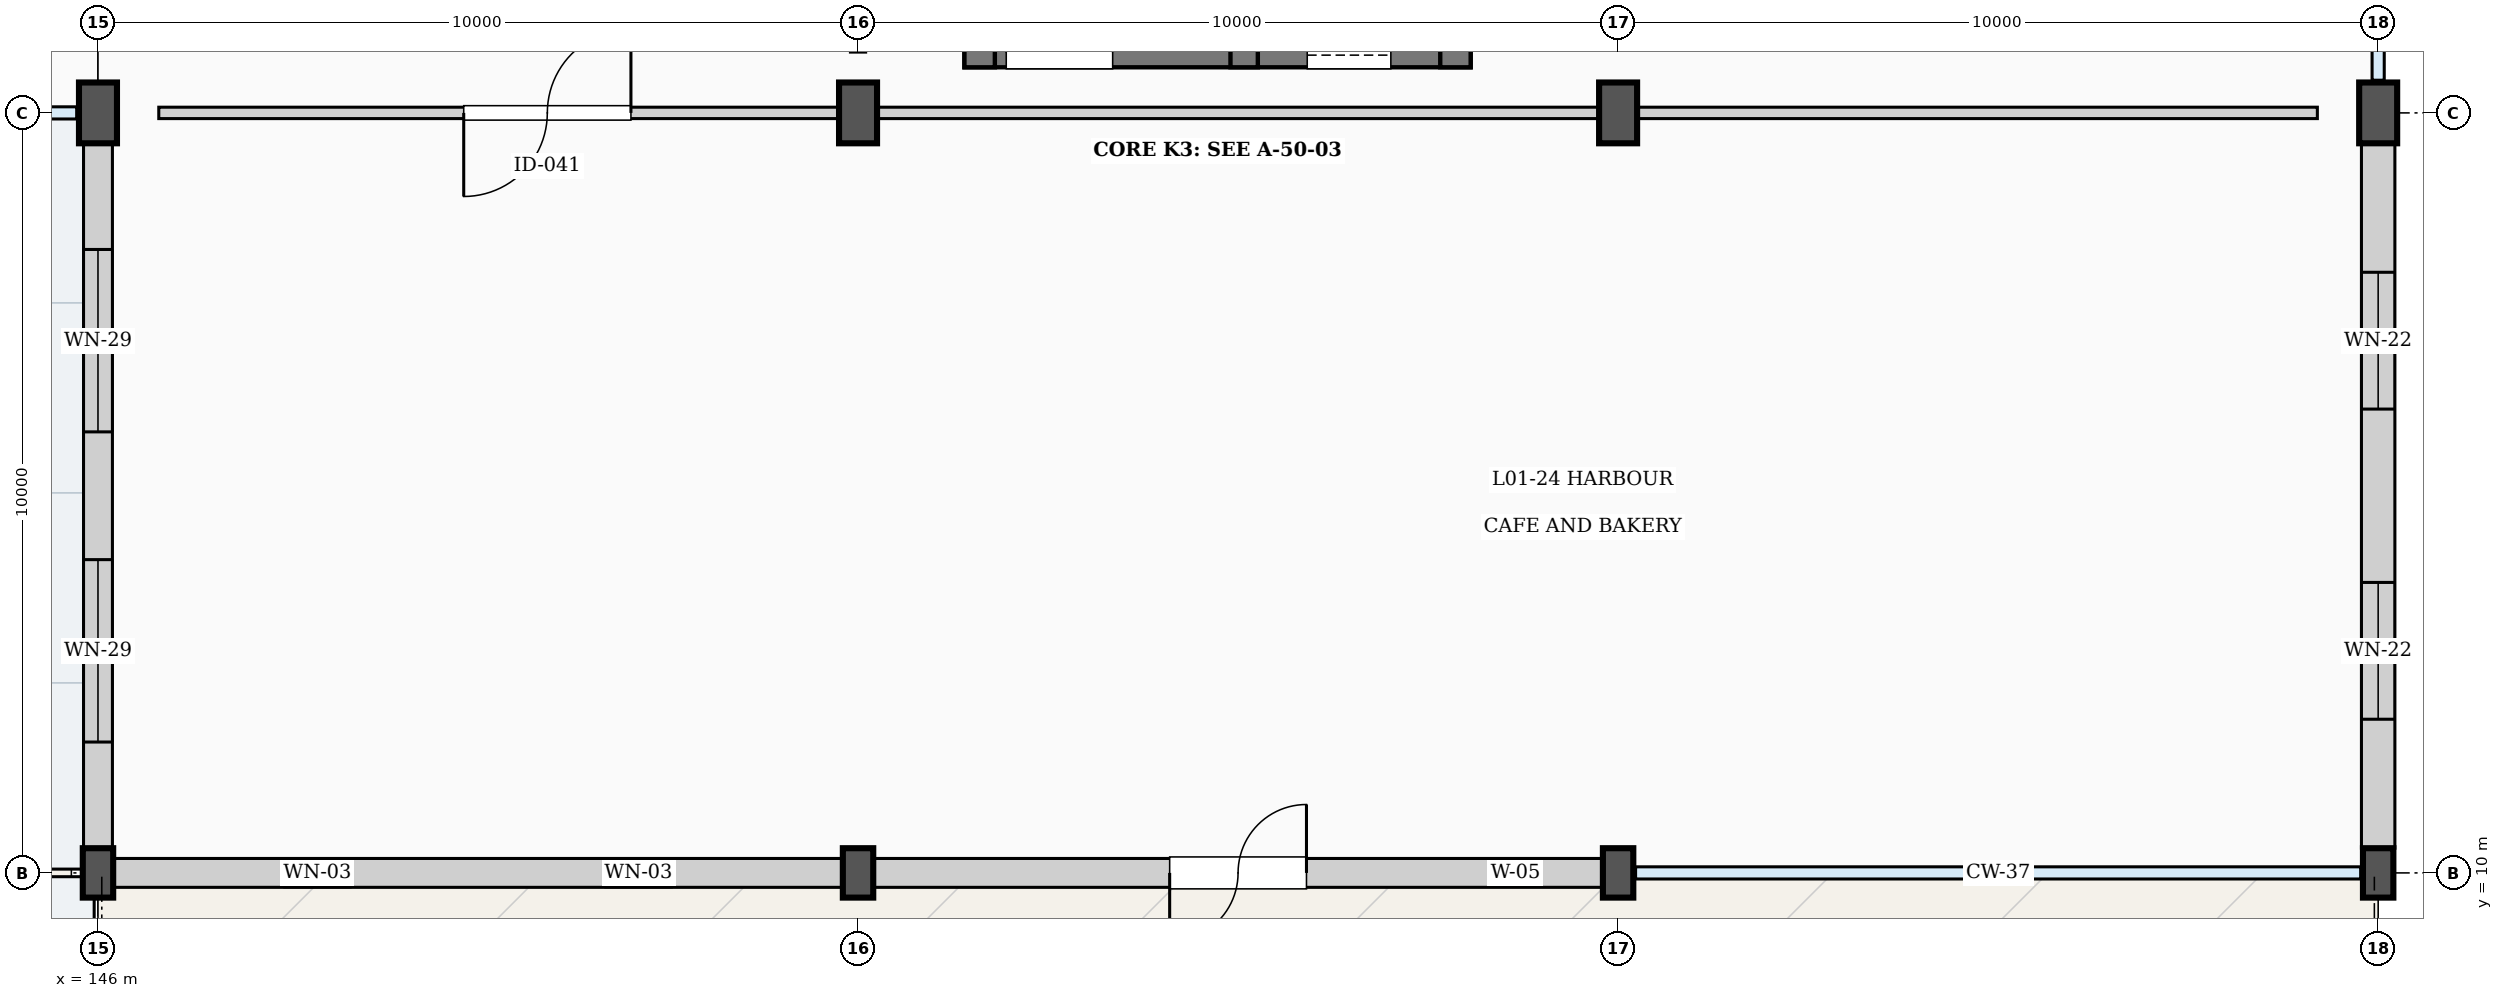
"""IFC4 building model, lengths in metres.
Left out: names, types, materials, properties, quantities, classifications, styles, units other than length and angle.
Written with IfcOpenShell. Run it as: python <this file> out.ifc"""

import sys

from ifc_helpers import new_model, si_unit, direction, frame, frame_2d, origin, origin_2d, place, context, subcontext, project, spatial, rectangle, extrude, element, fill, save


model = new_model("IFC4")
c1 = context("Model", 3, precision=1e-05, world=origin(), true_north=direction((0.0, 1.0)))
c2 = subcontext(c1, "Body", "Model", "MODEL_VIEW")
j1 = project(units=[si_unit("LENGTHUNIT", "METRE"), si_unit("PLANEANGLEUNIT", "RADIAN")], contexts=[c1])
p1 = place(None, origin())
s1 = spatial("IfcSite", under=j1, at=p1, CompositionType="ELEMENT")
p2 = place(p1, origin())
s2 = spatial("IfcBuilding", under=s1, at=p2, CompositionType="ELEMENT")
p3 = place(p2, frame((0.0, 0.0, 5.4)))
s3 = spatial("IfcBuildingStorey", under=s2, at=p3, CompositionType="ELEMENT", Elevation=5.4)
p4 = place(p3, frame((146.0, 10.0, 0.0), z_axis=(0.0, 0.0, 1.0), x_axis=(1.0, 0.0, 0.0)))
e1 = element("IfcColumn", 1, at=p4, inside=s3, PredefinedType="COLUMN", context=c2, shape_type="SweptSolid", body=[
    extrude(rectangle(XDim=0.4, YDim=0.65, at=origin_2d()), origin(), (0.0, 0.0, 1.0), 4.8),
])
p5 = place(p3, frame((146.0, 20.0, 0.0), z_axis=(0.0, 0.0, 1.0), x_axis=(1.0, 0.0, 0.0)))
e2 = element("IfcColumn", 2, at=p5, inside=s3, PredefinedType="COLUMN", context=c2, shape_type="SweptSolid", body=[
    extrude(rectangle(XDim=0.5, YDim=0.8, at=origin_2d()), origin(), (0.0, 0.0, 1.0), 4.8),
])
p6 = place(p3, frame((156.0, 10.0, 0.0), z_axis=(0.0, 0.0, 1.0), x_axis=(1.0, 0.0, 0.0)))
e3 = element("IfcColumn", 3, at=p6, inside=s3, PredefinedType="COLUMN", context=c2, shape_type="SweptSolid", body=[
    extrude(rectangle(XDim=0.4, YDim=0.65, at=origin_2d()), origin(), (0.0, 0.0, 1.0), 4.8),
])
p7 = place(p3, frame((156.0, 20.0, 0.0), z_axis=(0.0, 0.0, 1.0), x_axis=(1.0, 0.0, 0.0)))
e4 = element("IfcColumn", 4, at=p7, inside=s3, PredefinedType="COLUMN", context=c2, shape_type="SweptSolid", body=[
    extrude(rectangle(XDim=0.5, YDim=0.8, at=origin_2d()), origin(), (0.0, 0.0, 1.0), 4.8),
])
p8 = place(p3, frame((166.0, 10.0, 0.0), z_axis=(0.0, 0.0, 1.0), x_axis=(1.0, 0.0, 0.0)))
e5 = element("IfcColumn", 5, at=p8, inside=s3, PredefinedType="COLUMN", context=c2, shape_type="SweptSolid", body=[
    extrude(rectangle(XDim=0.4, YDim=0.65, at=origin_2d()), origin(), (0.0, 0.0, 1.0), 4.8),
])
p9 = place(p3, frame((166.0, 20.0, 0.0), z_axis=(0.0, 0.0, 1.0), x_axis=(1.0, 0.0, 0.0)))
e6 = element("IfcColumn", 6, at=p9, inside=s3, PredefinedType="COLUMN", context=c2, shape_type="SweptSolid", body=[
    extrude(rectangle(XDim=0.5, YDim=0.8, at=origin_2d()), origin(), (0.0, 0.0, 1.0), 4.8),
])
p10 = place(p3, frame((176.0, 10.0, 0.0), z_axis=(0.0, 0.0, 1.0), x_axis=(1.0, 0.0, 0.0)))
e7 = element("IfcColumn", 7, at=p10, inside=s3, PredefinedType="COLUMN", context=c2, shape_type="SweptSolid", body=[
    extrude(rectangle(XDim=0.4, YDim=0.65, at=origin_2d()), origin(), (0.0, 0.0, 1.0), 4.8),
])
p11 = place(p3, frame((176.0, 20.0, 0.0), z_axis=(0.0, 0.0, 1.0), x_axis=(1.0, 0.0, 0.0)))
e8 = element("IfcColumn", 8, at=p11, inside=s3, PredefinedType="COLUMN", context=c2, shape_type="SweptSolid", body=[
    extrude(rectangle(XDim=0.5, YDim=0.8, at=origin_2d()), origin(), (0.0, 0.0, 1.0), 4.8),
])
p12 = place(p3, frame((146.2, 10.0, 0.0), z_axis=(0.0, 0.0, 1.0), x_axis=(1.0, 0.0, 0.0)))
e9 = element("IfcWall", 9, at=p12, inside=s3, PredefinedType="SOLIDWALL", context=c2, shape_type="SweptSolid", body=[
    extrude(rectangle(XDim=9.6, YDim=0.38, at=frame_2d((4.8, 0.0))), origin(), (0.0, 0.0, 1.0), 4.05),
])
p13 = place(p12, frame((2.238, 0.0, 0.9)))
e10 = element("IfcOpeningElement", 10, at=p13, cuts=e9, PredefinedType="OPENING", context=c2, shape_type="SweptSolid", body=[
    extrude(rectangle(XDim=0.9, YDim=2.1, at=frame_2d((0.45, 1.05))), frame((0.0, 0.2, 0.0), z_axis=(0.0, -1.0, 0.0), x_axis=(1.0, 0.0, 0.0)), (0.0, 0.0, 1.0), 0.4),
])
p14 = place(p12, frame((6.462, 0.0, 0.9)))
e11 = element("IfcOpeningElement", 11, at=p14, cuts=e9, PredefinedType="OPENING", context=c2, shape_type="SweptSolid", body=[
    extrude(rectangle(XDim=0.9, YDim=2.1, at=frame_2d((0.45, 1.05))), frame((0.0, 0.2, 0.0), z_axis=(0.0, -1.0, 0.0), x_axis=(1.0, 0.0, 0.0)), (0.0, 0.0, 1.0), 0.4),
])
p15 = place(p3, frame((156.2, 10.0, 0.0), z_axis=(0.0, 0.0, 1.0), x_axis=(1.0, 0.0, 0.0)))
e12 = element("IfcWall", 12, at=p15, inside=s3, PredefinedType="SOLIDWALL", context=c2, shape_type="SweptSolid", body=[
    extrude(rectangle(XDim=9.6, YDim=0.38, at=frame_2d((4.8, 0.0))), origin(), (0.0, 0.0, 1.0), 4.05),
])
p16 = place(p15, frame((3.9, 0.0, 0.0)))
e13 = element("IfcOpeningElement", 13, at=p16, cuts=e12, PredefinedType="OPENING", context=c2, shape_type="SweptSolid", body=[
    extrude(rectangle(XDim=1.8, YDim=2.35, at=frame_2d((0.9, 1.175))), frame((0.0, 0.2, 0.0), z_axis=(0.0, -1.0, 0.0), x_axis=(1.0, 0.0, 0.0)), (0.0, 0.0, 1.0), 0.4),
])
p17 = place(p3, frame((146.0, 10.325, 0.0), z_axis=(0.0, 0.0, 1.0), x_axis=(0.0, 1.0, 0.0)))
e14 = element("IfcWall", 14, at=p17, inside=s3, PredefinedType="SOLIDWALL", context=c2, shape_type="SweptSolid", body=[
    extrude(rectangle(XDim=9.275, YDim=0.38, at=frame_2d((4.638, 0.0))), origin(), (0.0, 0.0, 1.0), 3.9),
])
p18 = place(p17, frame((1.397, 0.0, 1.9)))
e15 = element("IfcOpeningElement", 15, at=p18, cuts=e14, PredefinedType="OPENING", context=c2, shape_type="SweptSolid", body=[
    extrude(rectangle(XDim=2.4, YDim=1.5, at=frame_2d((1.2, 0.75))), frame((0.0, 0.2, 0.0), z_axis=(0.0, -1.0, 0.0), x_axis=(1.0, 0.0, 0.0)), (0.0, 0.0, 1.0), 0.4),
])
p19 = place(p17, frame((5.478, 0.0, 1.9)))
e16 = element("IfcOpeningElement", 16, at=p19, cuts=e14, PredefinedType="OPENING", context=c2, shape_type="SweptSolid", body=[
    extrude(rectangle(XDim=2.4, YDim=1.5, at=frame_2d((1.2, 0.75))), frame((0.0, 0.2, 0.0), z_axis=(0.0, -1.0, 0.0), x_axis=(1.0, 0.0, 0.0)), (0.0, 0.0, 1.0), 0.4),
])
p20 = place(p3, frame((176.0, 19.6, 0.0), z_axis=(0.0, 0.0, 1.0), x_axis=(0.0, -1.0, 0.0)))
e17 = element("IfcWall", 17, at=p20, inside=s3, PredefinedType="SOLIDWALL", context=c2, shape_type="SweptSolid", body=[
    extrude(rectangle(XDim=9.275, YDim=0.44, at=frame_2d((4.638, 0.0))), origin(), (0.0, 0.0, 1.0), 4.3),
])
p21 = place(p20, frame((1.697, 0.0, 0.9)))
e18 = element("IfcOpeningElement", 18, at=p21, cuts=e17, PredefinedType="OPENING", context=c2, shape_type="SweptSolid", body=[
    extrude(rectangle(XDim=1.8, YDim=3.0, at=frame_2d((0.9, 1.5))), frame((0.0, 0.23, 0.0), z_axis=(0.0, -1.0, 0.0), x_axis=(1.0, 0.0, 0.0)), (0.0, 0.0, 1.0), 0.46),
])
p22 = place(p20, frame((5.778, 0.0, 0.9)))
e19 = element("IfcOpeningElement", 19, at=p22, cuts=e17, PredefinedType="OPENING", context=c2, shape_type="SweptSolid", body=[
    extrude(rectangle(XDim=1.8, YDim=3.0, at=frame_2d((0.9, 1.5))), frame((0.0, 0.23, 0.0), z_axis=(0.0, -1.0, 0.0), x_axis=(1.0, 0.0, 0.0)), (0.0, 0.0, 1.0), 0.46),
])
p23 = place(p3, frame((157.4, 20.8, 0.0), z_axis=(0.0, 0.0, 1.0), x_axis=(1.0, 0.0, 0.0)))
e20 = element("IfcWall", 20, at=p23, inside=s3, PredefinedType="SHEAR", context=c2, shape_type="SweptSolid", body=[
    extrude(rectangle(XDim=6.66, YDim=0.4, at=frame_2d((3.33, 0.0))), origin(), (0.0, 0.0, 1.0), 4.8),
])
p24 = place(p23, frame((0.55, 0.0, 0.0)))
e21 = element("IfcOpeningElement", 21, at=p24, cuts=e20, PredefinedType="OPENING", context=c2, shape_type="SweptSolid", body=[
    extrude(rectangle(XDim=1.4, YDim=2.35, at=frame_2d((0.7, 1.175))), frame((0.0, 0.21, 0.0), z_axis=(0.0, -1.0, 0.0), x_axis=(1.0, 0.0, 0.0)), (0.0, 0.0, 1.0), 0.42),
])
p25 = place(p23, frame((4.51, 0.0, 0.0)))
e22 = element("IfcOpeningElement", 22, at=p25, cuts=e20, PredefinedType="OPENING", context=c2, shape_type="SweptSolid", body=[
    extrude(rectangle(XDim=1.1, YDim=2.3, at=frame_2d((0.55, 1.15))), frame((0.0, 0.21, 0.0), z_axis=(0.0, -1.0, 0.0), x_axis=(1.0, 0.0, 0.0)), (0.0, 0.0, 1.0), 0.42),
])
for number, where, z_axis, x_axis in (
    (23, (157.6, 20.6, 0.0), (0.0, 0.0, 1.0), (0.0, 1.0, 0.0)),
    (24, (163.86, 20.6, 0.0), (0.0, 0.0, 1.0), (0.0, 1.0, 0.0)),
):
    element("IfcWall", number, at=place(p3, frame(where, z_axis=z_axis, x_axis=x_axis)), inside=s3, PredefinedType="SHEAR", context=c2, shape_type="SweptSolid", body=[
        extrude(rectangle(XDim=8.8, YDim=0.4, at=frame_2d((4.4, 0.0))), origin(), (0.0, 0.0, 1.0), 4.8),
    ])
p26 = place(p3, frame((161.08, 20.6, 0.0), z_axis=(0.0, 0.0, 1.0), x_axis=(0.0, 1.0, 0.0)))
e25 = element("IfcWall", 25, at=p26, inside=s3, PredefinedType="SHEAR", context=c2, shape_type="SweptSolid", body=[
    extrude(rectangle(XDim=8.8, YDim=0.36, at=frame_2d((4.4, 0.0))), origin(), (0.0, 0.0, 1.0), 4.8),
])
p27 = place(p3, frame((146.8, 20.0, 0.0), z_axis=(0.0, 0.0, 1.0), x_axis=(1.0, 0.0, 0.0)))
e26 = element("IfcWall", 26, at=p27, inside=s3, PredefinedType="PARTITIONING", context=c2, shape_type="SweptSolid", body=[
    extrude(rectangle(XDim=28.4, YDim=0.15, at=frame_2d((14.2, 0.0))), origin(), (0.0, 0.0, 1.0), 3.97),
])
p28 = place(p27, frame((4.012, 0.0, 0.0)))
e27 = element("IfcOpeningElement", 27, at=p28, cuts=e26, PredefinedType="OPENING", context=c2, shape_type="SweptSolid", body=[
    extrude(rectangle(XDim=2.2, YDim=2.5, at=frame_2d((1.1, 1.25))), frame((0.0, 0.085, 0.0), z_axis=(0.0, -1.0, 0.0), x_axis=(1.0, 0.0, 0.0)), (0.0, 0.0, 1.0), 0.17),
])
p29 = place(p13, origin())
e28 = element("IfcWindow", 28, at=p29, inside=s3, PartitioningType="SINGLE_PANEL", PredefinedType="WINDOW", context=c2, shape_type="SweptSolid", body=[
    extrude(rectangle(XDim=0.9, YDim=2.1, at=frame_2d((0.45, 1.05))), frame((0.0, 0.03, 0.0), z_axis=(0.0, -1.0, 0.0), x_axis=(1.0, 0.0, 0.0)), (0.0, 0.0, 1.0), 0.06),
])
fill(e10, e28)
p30 = place(p14, origin())
e29 = element("IfcWindow", 29, at=p30, inside=s3, PartitioningType="SINGLE_PANEL", PredefinedType="WINDOW", context=c2, shape_type="SweptSolid", body=[
    extrude(rectangle(XDim=0.9, YDim=2.1, at=frame_2d((0.45, 1.05))), frame((0.0, 0.03, 0.0), z_axis=(0.0, -1.0, 0.0), x_axis=(1.0, 0.0, 0.0)), (0.0, 0.0, 1.0), 0.06),
])
fill(e11, e29)
p31 = place(p16, origin())
e30 = element("IfcDoor", 30, at=p31, inside=s3, OperationType="DOUBLE_DOOR_SINGLE_SWING", PredefinedType="DOOR", context=c2, shape_type="SweptSolid", body=[
    extrude(rectangle(XDim=1.8, YDim=2.35, at=frame_2d((0.9, 1.175))), frame((0.0, 0.025, 0.0), z_axis=(0.0, -1.0, 0.0), x_axis=(1.0, 0.0, 0.0)), (0.0, 0.0, 1.0), 0.05),
])
fill(e13, e30)
p32 = place(p18, origin())
e31 = element("IfcWindow", 31, at=p32, inside=s3, PartitioningType="SINGLE_PANEL", PredefinedType="WINDOW", context=c2, shape_type="SweptSolid", body=[
    extrude(rectangle(XDim=2.4, YDim=1.5, at=frame_2d((1.2, 0.75))), frame((0.0, 0.03, 0.0), z_axis=(0.0, -1.0, 0.0), x_axis=(1.0, 0.0, 0.0)), (0.0, 0.0, 1.0), 0.06),
])
fill(e15, e31)
p33 = place(p19, origin())
e32 = element("IfcWindow", 32, at=p33, inside=s3, PartitioningType="SINGLE_PANEL", PredefinedType="WINDOW", context=c2, shape_type="SweptSolid", body=[
    extrude(rectangle(XDim=2.4, YDim=1.5, at=frame_2d((1.2, 0.75))), frame((0.0, 0.03, 0.0), z_axis=(0.0, -1.0, 0.0), x_axis=(1.0, 0.0, 0.0)), (0.0, 0.0, 1.0), 0.06),
])
fill(e16, e32)
p34 = place(p21, origin())
e33 = element("IfcWindow", 33, at=p34, inside=s3, PartitioningType="SINGLE_PANEL", PredefinedType="WINDOW", context=c2, shape_type="SweptSolid", body=[
    extrude(rectangle(XDim=1.8, YDim=3.0, at=frame_2d((0.9, 1.5))), frame((0.0, 0.03, 0.0), z_axis=(0.0, -1.0, 0.0), x_axis=(1.0, 0.0, 0.0)), (0.0, 0.0, 1.0), 0.06),
])
fill(e18, e33)
p35 = place(p22, origin())
e34 = element("IfcWindow", 34, at=p35, inside=s3, PartitioningType="SINGLE_PANEL", PredefinedType="WINDOW", context=c2, shape_type="SweptSolid", body=[
    extrude(rectangle(XDim=1.8, YDim=3.0, at=frame_2d((0.9, 1.5))), frame((0.0, 0.03, 0.0), z_axis=(0.0, -1.0, 0.0), x_axis=(1.0, 0.0, 0.0)), (0.0, 0.0, 1.0), 0.06),
])
fill(e19, e34)
p36 = place(p24, origin())
e35 = element("IfcDoor", 35, at=p36, inside=s3, OperationType="SINGLE_SWING_RIGHT", PredefinedType="DOOR", context=c2, shape_type="SweptSolid", body=[
    extrude(rectangle(XDim=1.4, YDim=2.35, at=frame_2d((0.7, 1.175))), frame((0.0, 0.025, 0.0), z_axis=(0.0, -1.0, 0.0), x_axis=(1.0, 0.0, 0.0)), (0.0, 0.0, 1.0), 0.05),
])
fill(e21, e35)
p37 = place(p25, origin())
e36 = element("IfcDoor", 36, at=p37, inside=s3, OperationType="SLIDING_TO_LEFT", PredefinedType="DOOR", context=c2, shape_type="SweptSolid", body=[
    extrude(rectangle(XDim=1.1, YDim=2.3, at=frame_2d((0.55, 1.15))), frame((0.0, 0.025, 0.0), z_axis=(0.0, -1.0, 0.0), x_axis=(1.0, 0.0, 0.0)), (0.0, 0.0, 1.0), 0.05),
])
fill(e22, e36)
p38 = place(p28, origin())
e37 = element("IfcDoor", 37, at=p38, inside=s3, OperationType="DOUBLE_DOOR_SINGLE_SWING", PredefinedType="DOOR", context=c2, shape_type="SweptSolid", body=[
    extrude(rectangle(XDim=2.2, YDim=2.5, at=frame_2d((1.1, 1.25))), frame((0.0, 0.025, 0.0), z_axis=(0.0, -1.0, 0.0), x_axis=(1.0, 0.0, 0.0)), (0.0, 0.0, 1.0), 0.05),
])
fill(e27, e37)
save(model, sys.argv[1])
